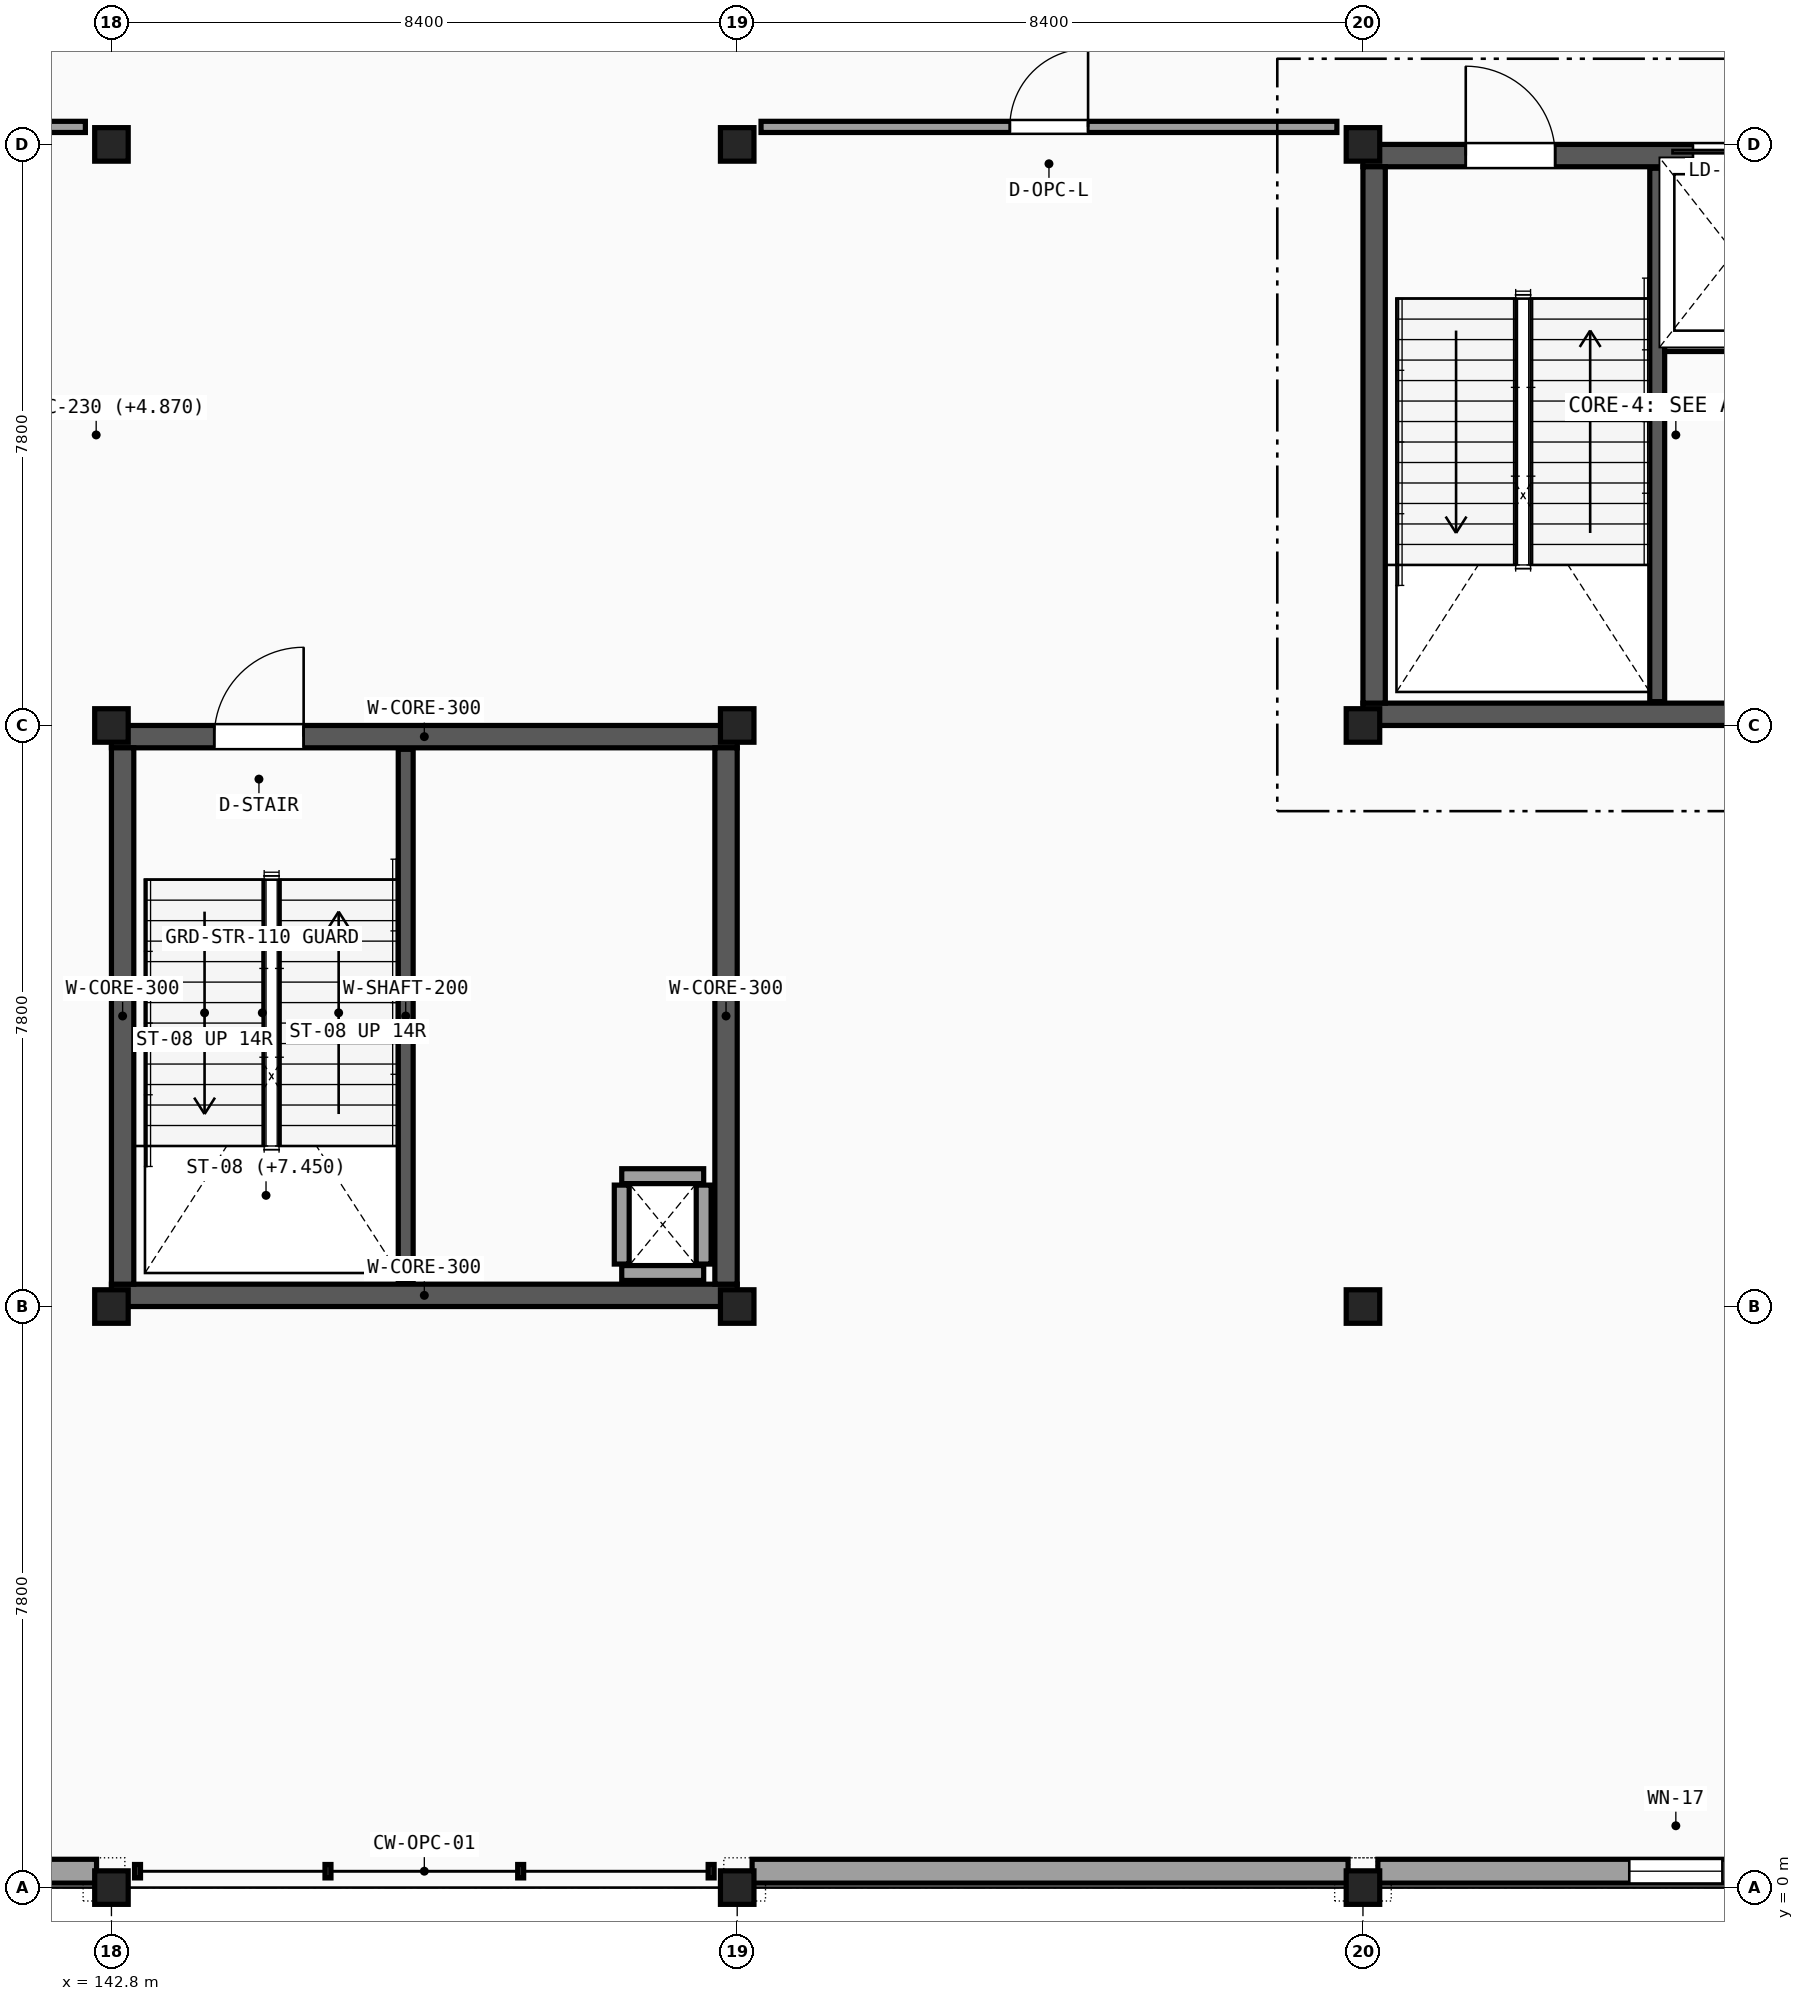
"""IFC4 building model, lengths in metres.
Left out: names, types, materials, properties, quantities, classifications, styles, units other than length and angle.
Written with IfcOpenShell. Run it as: python <this file> out.ifc"""

import sys

from ifc_helpers import new_model, si_unit, direction, frame, frame_2d, origin, origin_2d, place, context, subcontext, project, spatial, rectangle, i_section, extrude, element, fill, save


model = new_model("IFC4")
c1 = context("Model", 3, precision=1e-05, world=origin(), true_north=direction((0.0, 1.0)))
c2 = subcontext(c1, "Body", "Model", "MODEL_VIEW")
j1 = project(units=[si_unit("LENGTHUNIT", "METRE"), si_unit("PLANEANGLEUNIT", "RADIAN")], contexts=[c1])
p1 = place(None, origin())
s1 = spatial("IfcSite", under=j1, at=p1, CompositionType="ELEMENT")
p2 = place(p1, origin())
s2 = spatial("IfcBuilding", under=s1, at=p2, CompositionType="ELEMENT")
p3 = place(p2, frame((0.0, 0.0, 5.1)))
s3 = spatial("IfcBuildingStorey", under=s2, at=p3, CompositionType="ELEMENT", Elevation=5.1)
for number, where, z_axis, x_axis in (
    (1, (142.8, 0.0, 0.0), (0.0, 0.0, 1.0), (1.0, 0.0, 0.0)),
    (2, (142.8, 7.8, 0.0), (0.0, 0.0, 1.0), (1.0, 0.0, 0.0)),
    (3, (142.8, 15.6, 0.0), (0.0, 0.0, 1.0), (1.0, 0.0, 0.0)),
    (4, (142.8, 23.4, 0.0), (0.0, 0.0, 1.0), (1.0, 0.0, 0.0)),
    (5, (151.2, 0.0, 0.0), (0.0, 0.0, 1.0), (1.0, 0.0, 0.0)),
    (6, (151.2, 7.8, 0.0), (0.0, 0.0, 1.0), (1.0, 0.0, 0.0)),
    (7, (151.2, 15.6, 0.0), (0.0, 0.0, 1.0), (1.0, 0.0, 0.0)),
    (8, (151.2, 23.4, 0.0), (0.0, 0.0, 1.0), (1.0, 0.0, 0.0)),
    (9, (159.6, 0.0, 0.0), (0.0, 0.0, 1.0), (1.0, 0.0, 0.0)),
    (10, (159.6, 7.8, 0.0), (0.0, 0.0, 1.0), (1.0, 0.0, 0.0)),
    (11, (159.6, 15.6, 0.0), (0.0, 0.0, 1.0), (1.0, 0.0, 0.0)),
    (12, (159.6, 23.4, 0.0), (0.0, 0.0, 1.0), (1.0, 0.0, 0.0)),
):
    element("IfcColumn", number, at=place(p3, frame(where, z_axis=z_axis, x_axis=x_axis)), inside=s3, PredefinedType="COLUMN", context=c2, shape_type="SweptSolid", body=[
        extrude(i_section(OverallWidth=0.3, OverallDepth=0.45, WebThickness=0.014, FlangeThickness=0.026, FilletRadius=0.027, at=origin_2d()), origin(), (0.0, 0.0, 1.0), 5.1),
    ])
for number, where, z_axis, x_axis in (
    (13, (134.6, 0.22, 0.0), (0.0, 0.0, 1.0), (1.0, 0.0, 0.0)),
    (14, (151.4, 0.22, 0.0), (0.0, 0.0, 1.0), (1.0, 0.0, 0.0)),
):
    element("IfcWall", number, at=place(p3, frame(where, z_axis=z_axis, x_axis=x_axis)), inside=s3, PredefinedType="SOLIDWALL", context=c2, shape_type="SweptSolid", body=[
        extrude(rectangle(XDim=8.0, YDim=0.32, at=frame_2d((4.0, 0.0))), origin(), (0.0, 0.0, 1.0), 4.45),
    ])
p4 = place(p3, frame((159.8, 0.22, 0.0), z_axis=(0.0, 0.0, 1.0), x_axis=(1.0, 0.0, 0.0)))
e15 = element("IfcWall", 15, at=p4, inside=s3, PredefinedType="SOLIDWALL", context=c2, shape_type="SweptSolid", body=[
    extrude(rectangle(XDim=8.0, YDim=0.32, at=frame_2d((4.0, 0.0))), origin(), (0.0, 0.0, 1.0), 4.45),
])
p5 = place(p4, frame((3.375, 0.0, 0.95)))
e16 = element("IfcOpeningElement", 16, at=p5, cuts=e15, PredefinedType="OPENING", context=c2, shape_type="SweptSolid", body=[
    extrude(rectangle(XDim=1.25, YDim=1.5, at=frame_2d((0.625, 0.75))), frame((0.0, 0.17, 0.0), z_axis=(0.0, -1.0, 0.0), x_axis=(1.0, 0.0, 0.0)), (0.0, 0.0, 1.0), 0.34),
])
p6 = place(p3, frame((159.6, 15.75, 0.0), z_axis=(0.0, 0.0, 1.0), x_axis=(1.0, 0.0, 0.0)))
e17 = element("IfcWall", 17, at=p6, inside=s3, PredefinedType="SHEAR", context=c2, shape_type="SweptSolid", body=[
    extrude(rectangle(XDim=8.4, YDim=0.3, at=frame_2d((4.2, 0.0))), origin(), (0.0, 0.0, 1.0), 4.87),
])
p7 = place(p3, frame((159.6, 23.25, 0.0), z_axis=(0.0, 0.0, 1.0), x_axis=(1.0, 0.0, 0.0)))
e18 = element("IfcWall", 18, at=p7, inside=s3, PredefinedType="SHEAR", context=c2, shape_type="SweptSolid", body=[
    extrude(rectangle(XDim=8.4, YDim=0.3, at=frame_2d((4.2, 0.0))), origin(), (0.0, 0.0, 1.0), 4.87),
])
p8 = place(p7, frame((1.38, 0.0, 0.0)))
e19 = element("IfcOpeningElement", 19, at=p8, cuts=e18, PredefinedType="OPENING", context=c2, shape_type="SweptSolid", body=[
    extrude(rectangle(XDim=1.2, YDim=2.15, at=frame_2d((0.6, 1.075))), frame((0.0, 0.16, 0.0), z_axis=(0.0, -1.0, 0.0), x_axis=(1.0, 0.0, 0.0)), (0.0, 0.0, 1.0), 0.32),
])
p9 = place(p7, frame((4.43, 0.0, 0.0)))
e20 = element("IfcOpeningElement", 20, at=p9, cuts=e18, PredefinedType="OPENING", context=c2, shape_type="SweptSolid", body=[
    extrude(rectangle(XDim=1.1, YDim=2.15, at=frame_2d((0.55, 1.075))), frame((0.0, 0.16, 0.0), z_axis=(0.0, -1.0, 0.0), x_axis=(1.0, 0.0, 0.0)), (0.0, 0.0, 1.0), 0.32),
])
p10 = place(p7, frame((6.45, 0.0, 0.0)))
e21 = element("IfcOpeningElement", 21, at=p10, cuts=e18, PredefinedType="OPENING", context=c2, shape_type="SweptSolid", body=[
    extrude(rectangle(XDim=1.1, YDim=2.15, at=frame_2d((0.55, 1.075))), frame((0.0, 0.16, 0.0), z_axis=(0.0, -1.0, 0.0), x_axis=(1.0, 0.0, 0.0)), (0.0, 0.0, 1.0), 0.32),
])
p11 = place(p3, frame((159.75, 15.9, 0.0), z_axis=(0.0, 0.0, 1.0), x_axis=(0.0, 1.0, 0.0)))
e22 = element("IfcWall", 22, at=p11, inside=s3, PredefinedType="SHEAR", context=c2, shape_type="SweptSolid", body=[
    extrude(rectangle(XDim=7.2, YDim=0.3, at=frame_2d((3.6, 0.0))), origin(), (0.0, 0.0, 1.0), 4.87),
])
p12 = place(p3, frame((163.55, 15.92, 0.0), z_axis=(0.0, 0.0, 1.0), x_axis=(0.0, 1.0, 0.0)))
e23 = element("IfcWall", 23, at=p12, inside=s3, PredefinedType="SHEAR", context=c2, shape_type="SweptSolid", body=[
    extrude(rectangle(XDim=7.16, YDim=0.2, at=frame_2d((3.58, 0.0))), origin(), (0.0, 0.0, 1.0), 4.87),
])
p13 = place(p3, frame((163.65, 20.72, 0.0), z_axis=(0.0, 0.0, 1.0), x_axis=(1.0, 0.0, 0.0)))
e24 = element("IfcWall", 24, at=p13, inside=s3, PredefinedType="PARTITIONING", context=c2, shape_type="SweptSolid", body=[
    extrude(rectangle(XDim=1.86, YDim=0.2, at=frame_2d((0.93, 0.0))), origin(), (0.0, 0.0, 1.0), 4.25),
])
p14 = place(p3, frame((142.8, 7.95, 0.0), z_axis=(0.0, 0.0, 1.0), x_axis=(1.0, 0.0, 0.0)))
e25 = element("IfcWall", 25, at=p14, inside=s3, PredefinedType="SHEAR", context=c2, shape_type="SweptSolid", body=[
    extrude(rectangle(XDim=8.4, YDim=0.3, at=frame_2d((4.2, 0.0))), origin(), (0.0, 0.0, 1.0), 4.87),
])
p15 = place(p3, frame((142.8, 15.45, 0.0), z_axis=(0.0, 0.0, 1.0), x_axis=(1.0, 0.0, 0.0)))
e26 = element("IfcWall", 26, at=p15, inside=s3, PredefinedType="SHEAR", context=c2, shape_type="SweptSolid", body=[
    extrude(rectangle(XDim=8.4, YDim=0.3, at=frame_2d((4.2, 0.0))), origin(), (0.0, 0.0, 1.0), 4.87),
])
p16 = place(p15, frame((1.38, 0.0, 0.0)))
e27 = element("IfcOpeningElement", 27, at=p16, cuts=e26, PredefinedType="OPENING", context=c2, shape_type="SweptSolid", body=[
    extrude(rectangle(XDim=1.2, YDim=2.15, at=frame_2d((0.6, 1.075))), frame((0.0, 0.16, 0.0), z_axis=(0.0, -1.0, 0.0), x_axis=(1.0, 0.0, 0.0)), (0.0, 0.0, 1.0), 0.32),
])
for number, where, z_axis, x_axis in (
    (28, (142.95, 8.1, 0.0), (0.0, 0.0, 1.0), (0.0, 1.0, 0.0)),
    (29, (151.05, 8.1, 0.0), (0.0, 0.0, 1.0), (0.0, 1.0, 0.0)),
):
    element("IfcWall", number, at=place(p3, frame(where, z_axis=z_axis, x_axis=x_axis)), inside=s3, PredefinedType="SHEAR", context=c2, shape_type="SweptSolid", body=[
        extrude(rectangle(XDim=7.2, YDim=0.3, at=frame_2d((3.6, 0.0))), origin(), (0.0, 0.0, 1.0), 4.87),
    ])
p17 = place(p3, frame((146.75, 8.12, 0.0), z_axis=(0.0, 0.0, 1.0), x_axis=(0.0, 1.0, 0.0)))
e30 = element("IfcWall", 30, at=p17, inside=s3, PredefinedType="SHEAR", context=c2, shape_type="SweptSolid", body=[
    extrude(rectangle(XDim=7.16, YDim=0.2, at=frame_2d((3.58, 0.0))), origin(), (0.0, 0.0, 1.0), 4.87),
])
for number, where, z_axis, x_axis in (
    (31, (149.65, 8.25, 0.0), (0.0, 0.0, 1.0), (1.0, 0.0, 0.0)),
    (32, (149.65, 9.55, 0.0), (0.0, 0.0, 1.0), (1.0, 0.0, 0.0)),
):
    element("IfcWall", number, at=place(p3, frame(where, z_axis=z_axis, x_axis=x_axis)), inside=s3, PredefinedType="PARTITIONING", context=c2, shape_type="SweptSolid", body=[
        extrude(rectangle(XDim=1.1, YDim=0.2, at=frame_2d((0.55, 0.0))), origin(), (0.0, 0.0, 1.0), 4.25),
    ])
for number, where, z_axis, x_axis in (
    (33, (149.65, 8.37, 0.0), (0.0, 0.0, 1.0), (0.0, 1.0, 0.0)),
    (34, (150.75, 8.37, 0.0), (0.0, 0.0, 1.0), (0.0, 1.0, 0.0)),
):
    element("IfcWall", number, at=place(p3, frame(where, z_axis=z_axis, x_axis=x_axis)), inside=s3, PredefinedType="PARTITIONING", context=c2, shape_type="SweptSolid", body=[
        extrude(rectangle(XDim=1.06, YDim=0.2, at=frame_2d((0.53, 0.0))), origin(), (0.0, 0.0, 1.0), 4.25),
    ])
p18 = place(p3, frame((126.62, 23.635, 0.0), z_axis=(0.0, 0.0, 1.0), x_axis=(1.0, 0.0, 0.0)))
e35 = element("IfcWall", 35, at=p18, inside=s3, PredefinedType="PARTITIONING", context=c2, shape_type="SweptSolid", body=[
    extrude(rectangle(XDim=15.83, YDim=0.15, at=frame_2d((7.915, 0.0))), origin(), (0.0, 0.0, 1.0), 4.35),
])
p19 = place(p18, frame((8.44, 0.0, 0.0)))
e36 = element("IfcOpeningElement", 36, at=p19, cuts=e35, PredefinedType="OPENING", context=c2, shape_type="SweptSolid", body=[
    extrude(rectangle(XDim=1.05, YDim=2.15, at=frame_2d((0.525, 1.075))), frame((0.0, 0.085, 0.0), z_axis=(0.0, -1.0, 0.0), x_axis=(1.0, 0.0, 0.0)), (0.0, 0.0, 1.0), 0.17),
])
p20 = place(p3, frame((151.52, 23.635, 0.0), z_axis=(0.0, 0.0, 1.0), x_axis=(1.0, 0.0, 0.0)))
e37 = element("IfcWall", 37, at=p20, inside=s3, PredefinedType="PARTITIONING", context=c2, shape_type="SweptSolid", body=[
    extrude(rectangle(XDim=7.73, YDim=0.15, at=frame_2d((3.865, 0.0))), origin(), (0.0, 0.0, 1.0), 4.35),
])
p21 = place(p20, frame((3.34, 0.0, 0.0)))
e38 = element("IfcOpeningElement", 38, at=p21, cuts=e37, PredefinedType="OPENING", context=c2, shape_type="SweptSolid", body=[
    extrude(rectangle(XDim=1.05, YDim=2.15, at=frame_2d((0.525, 1.075))), frame((0.0, 0.085, 0.0), z_axis=(0.0, -1.0, 0.0), x_axis=(1.0, 0.0, 0.0)), (0.0, 0.0, 1.0), 0.17),
])
p22 = place(p5, origin())
e39 = element("IfcWindow", 39, at=p22, inside=s3, PartitioningType="SINGLE_PANEL", PredefinedType="WINDOW", context=c2, shape_type="SweptSolid", body=[
    extrude(rectangle(XDim=1.25, YDim=1.5, at=frame_2d((0.625, 0.75))), frame((0.0, 0.03, 0.0), z_axis=(0.0, -1.0, 0.0), x_axis=(1.0, 0.0, 0.0)), (0.0, 0.0, 1.0), 0.06),
])
fill(e16, e39)
p23 = place(p8, origin())
e40 = element("IfcDoor", 40, at=p23, inside=s3, OperationType="SINGLE_SWING_LEFT", PredefinedType="DOOR", context=c2, shape_type="SweptSolid", body=[
    extrude(rectangle(XDim=1.2, YDim=2.15, at=frame_2d((0.6, 1.075))), frame((0.0, 0.025, 0.0), z_axis=(0.0, -1.0, 0.0), x_axis=(1.0, 0.0, 0.0)), (0.0, 0.0, 1.0), 0.05),
])
fill(e19, e40)
p24 = place(p9, origin())
e41 = element("IfcDoor", 41, at=p24, inside=s3, OperationType="DOUBLE_DOOR_SLIDING", PredefinedType="DOOR", context=c2, shape_type="SweptSolid", body=[
    extrude(rectangle(XDim=1.1, YDim=2.15, at=frame_2d((0.55, 1.075))), frame((0.0, 0.025, 0.0), z_axis=(0.0, -1.0, 0.0), x_axis=(1.0, 0.0, 0.0)), (0.0, 0.0, 1.0), 0.05),
])
fill(e20, e41)
p25 = place(p16, origin())
e42 = element("IfcDoor", 42, at=p25, inside=s3, OperationType="SINGLE_SWING_RIGHT", PredefinedType="DOOR", context=c2, shape_type="SweptSolid", body=[
    extrude(rectangle(XDim=1.2, YDim=2.15, at=frame_2d((0.6, 1.075))), frame((0.0, 0.025, 0.0), z_axis=(0.0, -1.0, 0.0), x_axis=(1.0, 0.0, 0.0)), (0.0, 0.0, 1.0), 0.05),
])
fill(e27, e42)
p26 = place(p21, origin())
e43 = element("IfcDoor", 43, at=p26, inside=s3, OperationType="SINGLE_SWING_RIGHT", PredefinedType="DOOR", context=c2, shape_type="SweptSolid", body=[
    extrude(rectangle(XDim=1.05, YDim=2.15, at=frame_2d((0.525, 1.075))), frame((0.0, 0.025, 0.0), z_axis=(0.0, -1.0, 0.0), x_axis=(1.0, 0.0, 0.0)), (0.0, 0.0, 1.0), 0.05),
])
fill(e38, e43)
save(model, sys.argv[1])
